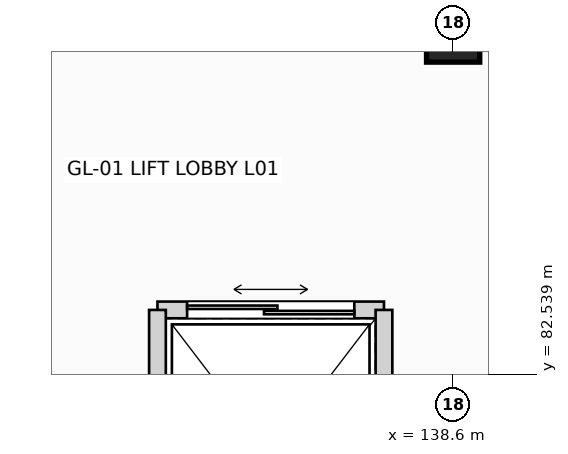
"""IFC4 building model, lengths in metres.
Left out: names, types, materials, properties, quantities, classifications, styles, units other than length and angle.
Written with IfcOpenShell. Run it as: python <this file> out.ifc"""

import sys

from ifc_helpers import new_model, si_unit, direction, frame, frame_2d, origin, origin_2d, place, context, subcontext, project, spatial, rectangle, extrude, element, fill, save


model = new_model("IFC4")
c1 = context("Model", 3, precision=1e-05, world=origin(), true_north=direction((0.0, 1.0)))
c2 = subcontext(c1, "Body", "Model", "MODEL_VIEW")
j1 = project(units=[si_unit("LENGTHUNIT", "METRE"), si_unit("PLANEANGLEUNIT", "RADIAN")], contexts=[c1])
p1 = place(None, origin())
s1 = spatial("IfcSite", under=j1, at=p1, CompositionType="ELEMENT")
p2 = place(p1, origin())
s2 = spatial("IfcBuilding", under=s1, at=p2, CompositionType="ELEMENT")
p3 = place(p2, frame((0.0, 0.0, 6.0)))
s3 = spatial("IfcBuildingStorey", under=s2, at=p3, CompositionType="ELEMENT", Elevation=6.0)
p4 = place(p3, frame((138.6, 87.0, 0.0), z_axis=(0.0, 0.0, 1.0), x_axis=(1.0, 0.0, 0.0)))
e1 = element("IfcColumn", 1, at=p4, inside=s3, PredefinedType="COLUMN", context=c2, shape_type="SweptSolid", body=[
    extrude(rectangle(XDim=0.7, YDim=0.7, at=origin_2d()), origin(), (0.0, 0.0, 1.0), 5.4),
])
p5 = place(p3, frame((134.71, 83.39, 0.0), z_axis=(0.0, 0.0, 1.0), x_axis=(1.0, 0.0, 0.0)))
e2 = element("IfcWall", 2, at=p5, inside=s3, PredefinedType="PARTITIONING", context=c2, shape_type="SweptSolid", body=[
    extrude(rectangle(XDim=2.98, YDim=0.22, at=frame_2d((1.49, 0.0))), origin(), (0.0, 0.0, 1.0), 5.015),
])
p6 = place(p5, frame((0.39, 0.0, 0.0)))
e3 = element("IfcOpeningElement", 3, at=p6, cuts=e2, PredefinedType="OPENING", context=c2, shape_type="SweptSolid", body=[
    extrude(rectangle(XDim=2.2, YDim=2.5, at=frame_2d((1.1, 1.25))), frame((0.0, 0.12, 0.0), z_axis=(0.0, -1.0, 0.0), x_axis=(1.0, 0.0, 0.0)), (0.0, 0.0, 1.0), 0.24),
])
for number, where, z_axis, x_axis in (
    (4, (134.71, 79.61, 0.0), (0.0, 0.0, 1.0), (0.0, 1.0, 0.0)),
    (5, (137.69, 79.61, 0.0), (0.0, 0.0, 1.0), (0.0, 1.0, 0.0)),
):
    element("IfcWall", number, at=place(p3, frame(where, z_axis=z_axis, x_axis=x_axis)), inside=s3, PredefinedType="PARTITIONING", context=c2, shape_type="SweptSolid", body=[
        extrude(rectangle(XDim=3.78, YDim=0.22, at=frame_2d((1.89, 0.0))), origin(), (0.0, 0.0, 1.0), 5.015),
    ])
p7 = place(p6, origin())
e6 = element("IfcDoor", 6, at=p7, inside=s3, OperationType="DOUBLE_DOOR_SLIDING", PredefinedType="DOOR", context=c2, shape_type="SweptSolid", body=[
    extrude(rectangle(XDim=2.2, YDim=2.5, at=frame_2d((1.1, 1.25))), frame((0.0, 0.025, 0.0), z_axis=(0.0, -1.0, 0.0), x_axis=(1.0, 0.0, 0.0)), (0.0, 0.0, 1.0), 0.05),
])
fill(e3, e6)
save(model, sys.argv[1])
